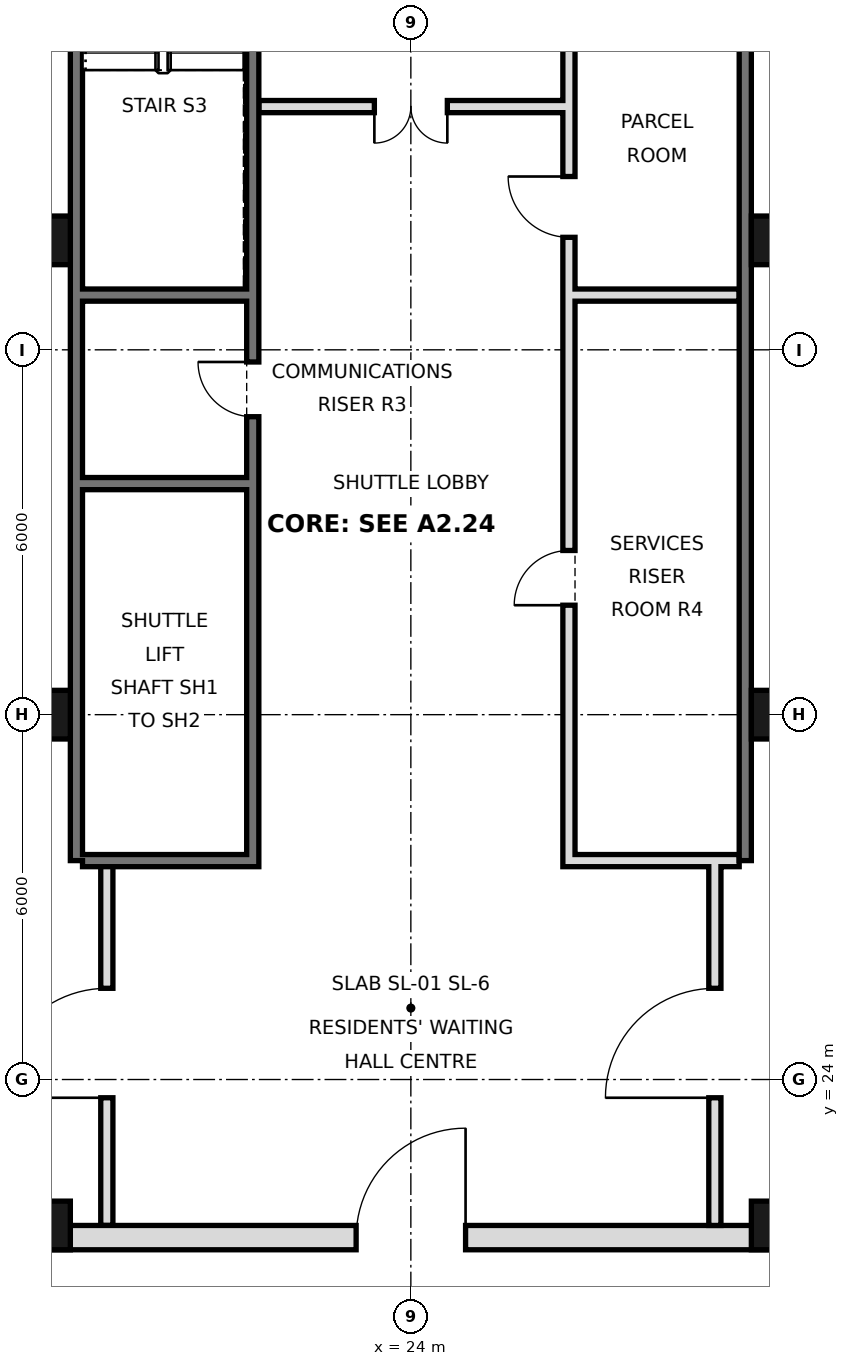
"""IFC4 building model, lengths in metres.
Left out: names, types, materials, properties, quantities, classifications, styles, units other than length and angle.
Written with IfcOpenShell. Run it as: python <this file> out.ifc"""

import sys

from ifc_helpers import new_model, si_unit, direction, frame, frame_2d, origin, origin_2d, place, context, subcontext, project, spatial, rectangle, hollow_rectangle, extrude, element, fill, save


model = new_model("IFC4")
c1 = context("Model", 3, precision=1e-05, world=origin(), true_north=direction((0.0, 1.0)))
c2 = subcontext(c1, "Body", "Model", "MODEL_VIEW")
j1 = project(units=[si_unit("LENGTHUNIT", "METRE"), si_unit("PLANEANGLEUNIT", "RADIAN")], contexts=[c1])
p1 = place(None, origin())
s1 = spatial("IfcSite", under=j1, at=p1, CompositionType="ELEMENT")
p2 = place(p1, origin())
s2 = spatial("IfcBuilding", under=s1, at=p2, CompositionType="ELEMENT")
p3 = place(p2, frame((0.0, 0.0, 96.2)))
s3 = spatial("IfcBuildingStorey", under=s2, at=p3, CompositionType="ELEMENT", Elevation=96.2)
for number, where, z_axis, x_axis in (
    (1, (18.0, 21.6, 0.0), (0.0, 0.0, 1.0), (1.0, 0.0, 0.0)),
    (2, (18.0, 30.0, 0.0), (0.0, 0.0, 1.0), (1.0, 0.0, 0.0)),
    (3, (18.0, 37.8, 0.0), (0.0, 0.0, 1.0), (1.0, 0.0, 0.0)),
    (4, (30.0, 21.6, 0.0), (0.0, 0.0, 1.0), (1.0, 0.0, 0.0)),
    (5, (30.0, 30.0, 0.0), (0.0, 0.0, 1.0), (1.0, 0.0, 0.0)),
    (6, (30.0, 37.8, 0.0), (0.0, 0.0, 1.0), (1.0, 0.0, 0.0)),
):
    element("IfcColumn", number, at=place(p3, frame(where, z_axis=z_axis, x_axis=x_axis)), inside=s3, PredefinedType="COLUMN", context=c2, shape_type="SweptSolid", body=[
        extrude(hollow_rectangle(XDim=0.8, YDim=0.8, WallThickness=0.05, at=origin_2d()), origin(), (0.0, 0.0, 1.0), 3.6),
    ])
for number, where, z_axis, x_axis in (
    (7, (18.5, 27.6, 0.0), (0.0, 0.0, 1.0), (0.0, 1.0, 0.0)),
    (8, (29.5, 27.6, 0.0), (0.0, 0.0, 1.0), (0.0, 1.0, 0.0)),
):
    element("IfcWall", number, at=place(p3, frame(where, z_axis=z_axis, x_axis=x_axis)), inside=s3, PredefinedType="SOLIDWALL", context=c2, shape_type="SweptSolid", body=[
        extrude(rectangle(XDim=17.5, YDim=0.2, at=frame_2d((8.75, 0.0))), origin(), (0.0, 0.0, 1.0), 3.42),
    ])
p4 = place(p3, frame((5.6, 21.4, 0.0), z_axis=(0.0, 0.0, 1.0), x_axis=(1.0, 0.0, 0.0)))
e9 = element("IfcWall", 9, at=p4, inside=s3, PredefinedType="SOLIDWALL", context=c2, shape_type="SweptSolid", body=[
    extrude(rectangle(XDim=36.8, YDim=0.4, at=frame_2d((18.4, 0.0))), origin(), (0.0, 0.0, 1.0), 3.42),
])
p5 = place(p4, frame((8.5, 0.0, 0.0)))
e10 = element("IfcOpeningElement", 10, at=p5, cuts=e9, PredefinedType="OPENING", context=c2, shape_type="SweptSolid", body=[
    extrude(rectangle(XDim=1.8, YDim=2.1, at=frame_2d((0.9, 1.05))), frame((0.0, 0.21, 0.0), z_axis=(0.0, -1.0, 0.0), x_axis=(1.0, 0.0, 0.0)), (0.0, 0.0, 1.0), 0.42),
])
p6 = place(p4, frame((17.5, 0.0, 0.0)))
e11 = element("IfcOpeningElement", 11, at=p6, cuts=e9, PredefinedType="OPENING", context=c2, shape_type="SweptSolid", body=[
    extrude(rectangle(XDim=1.8, YDim=2.1, at=frame_2d((0.9, 1.05))), frame((0.0, 0.21, 0.0), z_axis=(0.0, -1.0, 0.0), x_axis=(1.0, 0.0, 0.0)), (0.0, 0.0, 1.0), 0.42),
])
p7 = place(p4, frame((26.5, 0.0, 0.0)))
e12 = element("IfcOpeningElement", 12, at=p7, cuts=e9, PredefinedType="OPENING", context=c2, shape_type="SweptSolid", body=[
    extrude(rectangle(XDim=1.8, YDim=2.1, at=frame_2d((0.9, 1.05))), frame((0.0, 0.21, 0.0), z_axis=(0.0, -1.0, 0.0), x_axis=(1.0, 0.0, 0.0)), (0.0, 0.0, 1.0), 0.42),
])
p8 = place(p4, frame((4.5, 0.0, 0.0)))
e13 = element("IfcOpeningElement", 13, at=p8, cuts=e9, PredefinedType="OPENING", context=c2, shape_type="SweptSolid", body=[
    extrude(rectangle(XDim=1.2, YDim=2.1, at=frame_2d((0.6, 1.05))), frame((0.0, 0.21, 0.0), z_axis=(0.0, -1.0, 0.0), x_axis=(1.0, 0.0, 0.0)), (0.0, 0.0, 1.0), 0.42),
])
p9 = place(p4, frame((31.1, 0.0, 0.0)))
e14 = element("IfcOpeningElement", 14, at=p9, cuts=e9, PredefinedType="OPENING", context=c2, shape_type="SweptSolid", body=[
    extrude(rectangle(XDim=1.2, YDim=2.1, at=frame_2d((0.6, 1.05))), frame((0.0, 0.21, 0.0), z_axis=(0.0, -1.0, 0.0), x_axis=(1.0, 0.0, 0.0)), (0.0, 0.0, 1.0), 0.42),
])
p10 = place(p3, frame((19.0, 21.6, 0.0), z_axis=(0.0, 0.0, 1.0), x_axis=(0.0, 1.0, 0.0)))
e15 = element("IfcWall", 15, at=p10, inside=s3, PredefinedType="PARTITIONING", context=c2, shape_type="SweptSolid", body=[
    extrude(rectangle(XDim=6.0, YDim=0.2, at=frame_2d((3.0, 0.0))), origin(), (0.0, 0.0, 1.0), 3.42),
])
p11 = place(p10, frame((2.1, 0.0, 0.0)))
e16 = element("IfcOpeningElement", 16, at=p11, cuts=e15, PredefinedType="OPENING", context=c2, shape_type="SweptSolid", body=[
    extrude(rectangle(XDim=1.8, YDim=2.1, at=frame_2d((0.9, 1.05))), frame((0.0, 0.11, 0.0), z_axis=(0.0, -1.0, 0.0), x_axis=(1.0, 0.0, 0.0)), (0.0, 0.0, 1.0), 0.22),
])
p12 = place(p3, frame((29.0, 21.6, 0.0), z_axis=(0.0, 0.0, 1.0), x_axis=(0.0, 1.0, 0.0)))
e17 = element("IfcWall", 17, at=p12, inside=s3, PredefinedType="PARTITIONING", context=c2, shape_type="SweptSolid", body=[
    extrude(rectangle(XDim=6.0, YDim=0.2, at=frame_2d((3.0, 0.0))), origin(), (0.0, 0.0, 1.0), 3.42),
])
p13 = place(p12, frame((2.1, 0.0, 0.0)))
e18 = element("IfcOpeningElement", 18, at=p13, cuts=e17, PredefinedType="OPENING", context=c2, shape_type="SweptSolid", body=[
    extrude(rectangle(XDim=1.8, YDim=2.1, at=frame_2d((0.9, 1.05))), frame((0.0, 0.11, 0.0), z_axis=(0.0, -1.0, 0.0), x_axis=(1.0, 0.0, 0.0)), (0.0, 0.0, 1.0), 0.22),
])
p14 = place(p3, frame((21.4, 27.5, 0.0), z_axis=(0.0, 0.0, 1.0), x_axis=(0.0, 1.0, 0.0)))
e19 = element("IfcWall", 19, at=p14, inside=s3, PredefinedType="SOLIDWALL", context=c2, shape_type="SweptSolid", body=[
    extrude(rectangle(XDim=17.5, YDim=0.2, at=frame_2d((8.75, 0.0))), origin(), (0.0, 0.0, 1.0), 3.42),
])
p15 = place(p14, frame((16.2, 0.0, 0.0)))
e20 = element("IfcOpeningElement", 20, at=p15, cuts=e19, PredefinedType="OPENING", context=c2, shape_type="SweptSolid", body=[
    extrude(rectangle(XDim=1.0, YDim=2.1, at=frame_2d((0.5, 1.05))), frame((0.0, 0.11, 0.0), z_axis=(0.0, -1.0, 0.0), x_axis=(1.0, 0.0, 0.0)), (0.0, 0.0, 1.0), 0.22),
])
p16 = place(p14, frame((7.4, 0.0, 0.0)))
e21 = element("IfcOpeningElement", 21, at=p16, cuts=e19, PredefinedType="OPENING", context=c2, shape_type="SweptSolid", body=[
    extrude(rectangle(XDim=0.9, YDim=2.1, at=frame_2d((0.45, 1.05))), frame((0.0, 0.11, 0.0), z_axis=(0.0, -1.0, 0.0), x_axis=(1.0, 0.0, 0.0)), (0.0, 0.0, 1.0), 0.22),
])
p17 = place(p3, frame((26.6, 27.5, 0.0), z_axis=(0.0, 0.0, 1.0), x_axis=(0.0, 1.0, 0.0)))
e22 = element("IfcWall", 22, at=p17, inside=s3, PredefinedType="SOLIDWALL", context=c2, shape_type="SweptSolid", body=[
    extrude(rectangle(XDim=17.5, YDim=0.2, at=frame_2d((8.75, 0.0))), origin(), (0.0, 0.0, 1.0), 3.42),
])
p18 = place(p17, frame((4.3, 0.0, 0.0)))
e23 = element("IfcOpeningElement", 23, at=p18, cuts=e22, PredefinedType="OPENING", context=c2, shape_type="SweptSolid", body=[
    extrude(rectangle(XDim=0.9, YDim=2.1, at=frame_2d((0.45, 1.05))), frame((0.0, 0.11, 0.0), z_axis=(0.0, -1.0, 0.0), x_axis=(1.0, 0.0, 0.0)), (0.0, 0.0, 1.0), 0.22),
])
p19 = place(p17, frame((10.35, 0.0, 0.0)))
e24 = element("IfcOpeningElement", 24, at=p19, cuts=e22, PredefinedType="OPENING", context=c2, shape_type="SweptSolid", body=[
    extrude(rectangle(XDim=1.0, YDim=2.1, at=frame_2d((0.5, 1.05))), frame((0.0, 0.11, 0.0), z_axis=(0.0, -1.0, 0.0), x_axis=(1.0, 0.0, 0.0)), (0.0, 0.0, 1.0), 0.22),
])
p20 = place(p17, frame((15.475, 0.0, 0.0)))
e25 = element("IfcOpeningElement", 25, at=p20, cuts=e22, PredefinedType="OPENING", context=c2, shape_type="SweptSolid", body=[
    extrude(rectangle(XDim=1.0, YDim=2.1, at=frame_2d((0.5, 1.05))), frame((0.0, 0.11, 0.0), z_axis=(0.0, -1.0, 0.0), x_axis=(1.0, 0.0, 0.0)), (0.0, 0.0, 1.0), 0.22),
])
for number, where, z_axis, x_axis in (
    (26, (18.6, 27.6, 0.0), (0.0, 0.0, 1.0), (1.0, 0.0, 0.0)),
    (27, (26.7, 27.6, 0.0), (0.0, 0.0, 1.0), (1.0, 0.0, 0.0)),
    (28, (18.6, 33.8, 0.0), (0.0, 0.0, 1.0), (1.0, 0.0, 0.0)),
    (29, (18.6, 36.9, 0.0), (0.0, 0.0, 1.0), (1.0, 0.0, 0.0)),
    (30, (26.7, 36.9, 0.0), (0.0, 0.0, 1.0), (1.0, 0.0, 0.0)),
):
    element("IfcWall", number, at=place(p3, frame(where, z_axis=z_axis, x_axis=x_axis)), inside=s3, PredefinedType="SOLIDWALL", context=c2, shape_type="SweptSolid", body=[
        extrude(rectangle(XDim=2.7, YDim=0.2, at=frame_2d((1.35, 0.0))), origin(), (0.0, 0.0, 1.0), 3.42),
    ])
p21 = place(p3, frame((21.5, 40.0, 0.0), z_axis=(0.0, 0.0, 1.0), x_axis=(1.0, 0.0, 0.0)))
e31 = element("IfcWall", 31, at=p21, inside=s3, PredefinedType="PARTITIONING", context=c2, shape_type="SweptSolid", body=[
    extrude(rectangle(XDim=5.0, YDim=0.2, at=frame_2d((2.5, 0.0))), origin(), (0.0, 0.0, 1.0), 3.42),
])
p22 = place(p21, frame((1.9, 0.0, 0.0)))
e32 = element("IfcOpeningElement", 32, at=p22, cuts=e31, PredefinedType="OPENING", context=c2, shape_type="SweptSolid", body=[
    extrude(rectangle(XDim=1.2, YDim=2.1, at=frame_2d((0.6, 1.05))), frame((0.0, 0.11, 0.0), z_axis=(0.0, -1.0, 0.0), x_axis=(1.0, 0.0, 0.0)), (0.0, 0.0, 1.0), 0.22),
])
p23 = place(p11, origin())
e33 = element("IfcDoor", 33, at=p23, inside=s3, OperationType="SINGLE_SWING_LEFT", PredefinedType="DOOR", context=c2, shape_type="SweptSolid", body=[
    extrude(rectangle(XDim=1.8, YDim=2.1, at=frame_2d((0.9, 1.05))), frame((0.0, 0.025, 0.0), z_axis=(0.0, -1.0, 0.0), x_axis=(1.0, 0.0, 0.0)), (0.0, 0.0, 1.0), 0.05),
])
fill(e16, e33)
p24 = place(p6, frame((1.8, 0.0, 0.0), z_axis=(0.0, 0.0, 1.0), x_axis=(-1.0, 0.0, 0.0)))
e34 = element("IfcDoor", 34, at=p24, inside=s3, OperationType="SINGLE_SWING_LEFT", PredefinedType="DOOR", context=c2, shape_type="SweptSolid", body=[
    extrude(rectangle(XDim=1.8, YDim=2.1, at=frame_2d((0.9, 1.05))), frame((0.0, 0.025, 0.0), z_axis=(0.0, -1.0, 0.0), x_axis=(1.0, 0.0, 0.0)), (0.0, 0.0, 1.0), 0.05),
])
fill(e11, e34)
p25 = place(p13, origin())
e35 = element("IfcDoor", 35, at=p25, inside=s3, OperationType="SINGLE_SWING_LEFT", PredefinedType="DOOR", context=c2, shape_type="SweptSolid", body=[
    extrude(rectangle(XDim=1.8, YDim=2.1, at=frame_2d((0.9, 1.05))), frame((0.0, 0.025, 0.0), z_axis=(0.0, -1.0, 0.0), x_axis=(1.0, 0.0, 0.0)), (0.0, 0.0, 1.0), 0.05),
])
fill(e18, e35)
p26 = place(p22, frame((1.2, 0.0, 0.0), z_axis=(0.0, 0.0, 1.0), x_axis=(-1.0, 0.0, 0.0)))
e36 = element("IfcDoor", 36, at=p26, inside=s3, OperationType="DOUBLE_DOOR_SINGLE_SWING", PredefinedType="DOOR", context=c2, shape_type="SweptSolid", body=[
    extrude(rectangle(XDim=1.2, YDim=2.1, at=frame_2d((0.6, 1.05))), frame((0.0, 0.025, 0.0), z_axis=(0.0, -1.0, 0.0), x_axis=(1.0, 0.0, 0.0)), (0.0, 0.0, 1.0), 0.05),
])
fill(e32, e36)
p27 = place(p16, frame((0.9, 0.0, 0.0), z_axis=(0.0, 0.0, 1.0), x_axis=(-1.0, 0.0, 0.0)))
e37 = element("IfcDoor", 37, at=p27, inside=s3, OperationType="SINGLE_SWING_LEFT", PredefinedType="DOOR", context=c2, shape_type="SweptSolid", body=[
    extrude(rectangle(XDim=0.9, YDim=2.1, at=frame_2d((0.45, 1.05))), frame((0.0, 0.025, 0.0), z_axis=(0.0, -1.0, 0.0), x_axis=(1.0, 0.0, 0.0)), (0.0, 0.0, 1.0), 0.05),
])
fill(e21, e37)
p28 = place(p18, origin())
e38 = element("IfcDoor", 38, at=p28, inside=s3, OperationType="SINGLE_SWING_LEFT", PredefinedType="DOOR", context=c2, shape_type="SweptSolid", body=[
    extrude(rectangle(XDim=0.9, YDim=2.1, at=frame_2d((0.45, 1.05))), frame((0.0, 0.025, 0.0), z_axis=(0.0, -1.0, 0.0), x_axis=(1.0, 0.0, 0.0)), (0.0, 0.0, 1.0), 0.05),
])
fill(e23, e38)
p29 = place(p19, frame((1.0, 0.0, 0.0), z_axis=(0.0, 0.0, 1.0), x_axis=(-1.0, 0.0, 0.0)))
e39 = element("IfcDoor", 39, at=p29, inside=s3, OperationType="SINGLE_SWING_LEFT", PredefinedType="DOOR", context=c2, shape_type="SweptSolid", body=[
    extrude(rectangle(XDim=1.0, YDim=2.1, at=frame_2d((0.5, 1.05))), frame((0.0, 0.025, 0.0), z_axis=(0.0, -1.0, 0.0), x_axis=(1.0, 0.0, 0.0)), (0.0, 0.0, 1.0), 0.05),
])
fill(e24, e39)
save(model, sys.argv[1])
